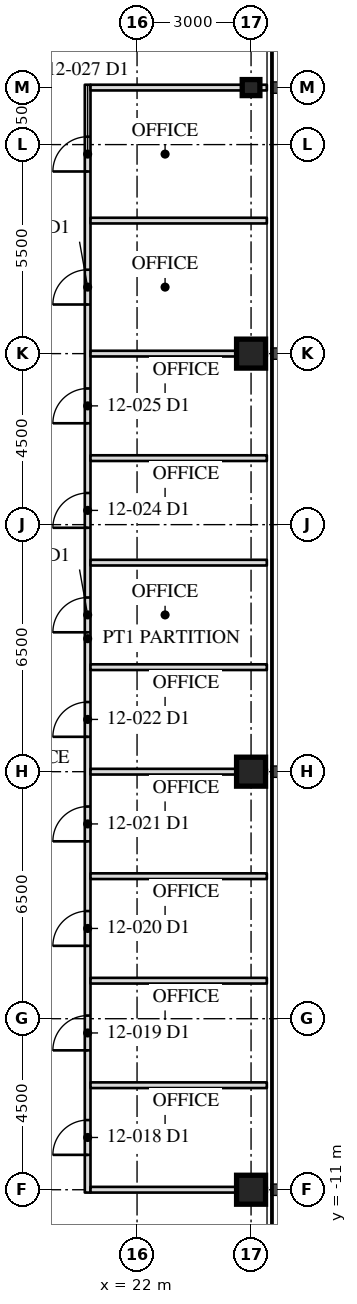
"""IFC4 building model, lengths in metres.
Left out: names, types, materials, properties, quantities, classifications, styles, units other than length and angle.
Written with IfcOpenShell. Run it as: python <this file> out.ifc"""

import sys

from ifc_helpers import new_model, si_unit, direction, frame, frame_2d, origin, origin_2d, place, context, subcontext, project, spatial, rectangle, hollow_rectangle, i_section, extrude, element, fill, save


model = new_model("IFC4")
c1 = context("Model", 3, precision=1e-05, world=origin(), true_north=direction((0.0, 1.0)))
c2 = subcontext(c1, "Body", "Model", "MODEL_VIEW")
j1 = project(units=[si_unit("LENGTHUNIT", "METRE"), si_unit("PLANEANGLEUNIT", "RADIAN")], contexts=[c1])
p1 = place(None, origin())
s1 = spatial("IfcSite", under=j1, at=p1, CompositionType="ELEMENT")
p2 = place(p1, origin())
s2 = spatial("IfcBuilding", under=s1, at=p2, CompositionType="ELEMENT")
p3 = place(p2, frame((0.0, 0.0, 52.9)))
s3 = spatial("IfcBuildingStorey", under=s2, at=p3, CompositionType="ELEMENT", Elevation=52.9)
for number, where, z_axis, x_axis in (
    (1, (25.0, -11.0, 0.0), (0.0, 0.0, 1.0), (0.0, 1.0, 0.0)),
    (2, (25.0, 0.0, 0.0), (0.0, 0.0, 1.0), (0.0, 1.0, 0.0)),
    (3, (25.0, 11.0, 0.0), (0.0, 0.0, 1.0), (0.0, 1.0, 0.0)),
):
    element("IfcColumn", number, at=place(p3, frame(where, z_axis=z_axis, x_axis=x_axis)), inside=s3, PredefinedType="COLUMN", context=c2, shape_type="SweptSolid", body=[
        extrude(hollow_rectangle(XDim=0.762, YDim=0.762, WallThickness=0.127, at=origin_2d()), origin(), (0.0, 0.0, 1.0), 4.1),
    ])
p4 = place(p3, frame((25.0, 18.0, 0.0), z_axis=(0.0, 0.0, 1.0), x_axis=(0.0, 1.0, 0.0)))
e4 = element("IfcColumn", 4, at=p4, inside=s3, PredefinedType="COLUMN", context=c2, shape_type="SweptSolid", body=[
    extrude(i_section(OverallWidth=0.422, OverallDepth=0.465, WebThickness=0.045, FlangeThickness=0.073, at=origin_2d()), origin(), (0.0, 0.0, 1.0), 4.1),
])
p5 = place(p3, frame((20.7, -11.075, 0.0), z_axis=(0.0, 0.0, 1.0), x_axis=(0.0, 1.0, 0.0)))
e5 = element("IfcWall", 5, at=p5, inside=s3, PredefinedType="PARTITIONING", context=c2, shape_type="SweptSolid", body=[
    extrude(rectangle(XDim=29.15, YDim=0.15, at=frame_2d((14.575, 0.0))), origin(), (0.0, 0.0, 1.0), 3.91),
])
p6 = place(p5, frame((0.992, 0.0, 0.0)))
e6 = element("IfcOpeningElement", 6, at=p6, cuts=e5, PredefinedType="OPENING", context=c2, shape_type="SweptSolid", body=[
    extrude(rectangle(XDim=0.915, YDim=2.134, at=frame_2d((0.458, 1.067))), frame((0.0, 0.085, 0.0), z_axis=(0.0, -1.0, 0.0), x_axis=(1.0, 0.0, 0.0)), (0.0, 0.0, 1.0), 0.17),
])
p7 = place(p5, frame((3.742, 0.0, 0.0)))
e7 = element("IfcOpeningElement", 7, at=p7, cuts=e5, PredefinedType="OPENING", context=c2, shape_type="SweptSolid", body=[
    extrude(rectangle(XDim=0.915, YDim=2.134, at=frame_2d((0.458, 1.067))), frame((0.0, 0.085, 0.0), z_axis=(0.0, -1.0, 0.0), x_axis=(1.0, 0.0, 0.0)), (0.0, 0.0, 1.0), 0.17),
])
p8 = place(p5, frame((6.492, 0.0, 0.0)))
e8 = element("IfcOpeningElement", 8, at=p8, cuts=e5, PredefinedType="OPENING", context=c2, shape_type="SweptSolid", body=[
    extrude(rectangle(XDim=0.915, YDim=2.134, at=frame_2d((0.458, 1.067))), frame((0.0, 0.085, 0.0), z_axis=(0.0, -1.0, 0.0), x_axis=(1.0, 0.0, 0.0)), (0.0, 0.0, 1.0), 0.17),
])
p9 = place(p5, frame((9.242, 0.0, 0.0)))
e9 = element("IfcOpeningElement", 9, at=p9, cuts=e5, PredefinedType="OPENING", context=c2, shape_type="SweptSolid", body=[
    extrude(rectangle(XDim=0.915, YDim=2.134, at=frame_2d((0.458, 1.067))), frame((0.0, 0.085, 0.0), z_axis=(0.0, -1.0, 0.0), x_axis=(1.0, 0.0, 0.0)), (0.0, 0.0, 1.0), 0.17),
])
p10 = place(p5, frame((11.992, 0.0, 0.0)))
e10 = element("IfcOpeningElement", 10, at=p10, cuts=e5, PredefinedType="OPENING", context=c2, shape_type="SweptSolid", body=[
    extrude(rectangle(XDim=0.915, YDim=2.134, at=frame_2d((0.458, 1.067))), frame((0.0, 0.085, 0.0), z_axis=(0.0, -1.0, 0.0), x_axis=(1.0, 0.0, 0.0)), (0.0, 0.0, 1.0), 0.17),
])
p11 = place(p5, frame((14.742, 0.0, 0.0)))
e11 = element("IfcOpeningElement", 11, at=p11, cuts=e5, PredefinedType="OPENING", context=c2, shape_type="SweptSolid", body=[
    extrude(rectangle(XDim=0.915, YDim=2.134, at=frame_2d((0.458, 1.067))), frame((0.0, 0.085, 0.0), z_axis=(0.0, -1.0, 0.0), x_axis=(1.0, 0.0, 0.0)), (0.0, 0.0, 1.0), 0.17),
])
p12 = place(p5, frame((17.492, 0.0, 0.0)))
e12 = element("IfcOpeningElement", 12, at=p12, cuts=e5, PredefinedType="OPENING", context=c2, shape_type="SweptSolid", body=[
    extrude(rectangle(XDim=0.915, YDim=2.134, at=frame_2d((0.458, 1.067))), frame((0.0, 0.085, 0.0), z_axis=(0.0, -1.0, 0.0), x_axis=(1.0, 0.0, 0.0)), (0.0, 0.0, 1.0), 0.17),
])
p13 = place(p5, frame((20.242, 0.0, 0.0)))
e13 = element("IfcOpeningElement", 13, at=p13, cuts=e5, PredefinedType="OPENING", context=c2, shape_type="SweptSolid", body=[
    extrude(rectangle(XDim=0.915, YDim=2.134, at=frame_2d((0.458, 1.067))), frame((0.0, 0.085, 0.0), z_axis=(0.0, -1.0, 0.0), x_axis=(1.0, 0.0, 0.0)), (0.0, 0.0, 1.0), 0.17),
])
p14 = place(p5, frame((23.367, 0.0, 0.0)))
e14 = element("IfcOpeningElement", 14, at=p14, cuts=e5, PredefinedType="OPENING", context=c2, shape_type="SweptSolid", body=[
    extrude(rectangle(XDim=0.915, YDim=2.134, at=frame_2d((0.458, 1.067))), frame((0.0, 0.085, 0.0), z_axis=(0.0, -1.0, 0.0), x_axis=(1.0, 0.0, 0.0)), (0.0, 0.0, 1.0), 0.17),
])
p15 = place(p5, frame((26.867, 0.0, 0.0)))
e15 = element("IfcOpeningElement", 15, at=p15, cuts=e5, PredefinedType="OPENING", context=c2, shape_type="SweptSolid", body=[
    extrude(rectangle(XDim=0.915, YDim=2.134, at=frame_2d((0.458, 1.067))), frame((0.0, 0.085, 0.0), z_axis=(0.0, -1.0, 0.0), x_axis=(1.0, 0.0, 0.0)), (0.0, 0.0, 1.0), 0.17),
])
p16 = place(p3, frame((20.775, -11.0, 0.0), z_axis=(0.0, 0.0, 1.0), x_axis=(1.0, 0.0, 0.0)))
e16 = element("IfcWall", 16, at=p16, inside=s3, PredefinedType="PARTITIONING", context=c2, shape_type="SweptSolid", body=[
    extrude(rectangle(XDim=4.64, YDim=0.15, at=frame_2d((2.32, 0.0))), origin(), (0.0, 0.0, 1.0), 3.13),
])
for number, where, z_axis, x_axis in (
    (17, (20.775, -8.25, 0.0), (0.0, 0.0, 1.0), (1.0, 0.0, 0.0)),
    (18, (20.775, -5.5, 0.0), (0.0, 0.0, 1.0), (1.0, 0.0, 0.0)),
    (19, (20.775, -2.75, 0.0), (0.0, 0.0, 1.0), (1.0, 0.0, 0.0)),
):
    element("IfcWall", number, at=place(p3, frame(where, z_axis=z_axis, x_axis=x_axis)), inside=s3, PredefinedType="PARTITIONING", context=c2, shape_type="SweptSolid", body=[
        extrude(rectangle(XDim=4.64, YDim=0.15, at=frame_2d((2.32, 0.0))), origin(), (0.0, 0.0, 1.0), 3.91),
    ])
p17 = place(p3, frame((20.775, 0.0, 0.0), z_axis=(0.0, 0.0, 1.0), x_axis=(1.0, 0.0, 0.0)))
e20 = element("IfcWall", 20, at=p17, inside=s3, PredefinedType="PARTITIONING", context=c2, shape_type="SweptSolid", body=[
    extrude(rectangle(XDim=4.64, YDim=0.15, at=frame_2d((2.32, 0.0))), origin(), (0.0, 0.0, 1.0), 3.13),
])
for number, where, z_axis, x_axis in (
    (21, (20.775, 2.75, 0.0), (0.0, 0.0, 1.0), (1.0, 0.0, 0.0)),
    (22, (20.775, 5.5, 0.0), (0.0, 0.0, 1.0), (1.0, 0.0, 0.0)),
    (23, (20.775, 8.25, 0.0), (0.0, 0.0, 1.0), (1.0, 0.0, 0.0)),
):
    element("IfcWall", number, at=place(p3, frame(where, z_axis=z_axis, x_axis=x_axis)), inside=s3, PredefinedType="PARTITIONING", context=c2, shape_type="SweptSolid", body=[
        extrude(rectangle(XDim=4.64, YDim=0.15, at=frame_2d((2.32, 0.0))), origin(), (0.0, 0.0, 1.0), 3.91),
    ])
p18 = place(p3, frame((20.775, 11.0, 0.0), z_axis=(0.0, 0.0, 1.0), x_axis=(1.0, 0.0, 0.0)))
e24 = element("IfcWall", 24, at=p18, inside=s3, PredefinedType="PARTITIONING", context=c2, shape_type="SweptSolid", body=[
    extrude(rectangle(XDim=4.64, YDim=0.15, at=frame_2d((2.32, 0.0))), origin(), (0.0, 0.0, 1.0), 3.13),
])
for number, where, z_axis, x_axis in (
    (25, (20.775, 14.5, 0.0), (0.0, 0.0, 1.0), (1.0, 0.0, 0.0)),
    (26, (20.775, 18.0, 0.0), (0.0, 0.0, 1.0), (1.0, 0.0, 0.0)),
):
    element("IfcWall", number, at=place(p3, frame(where, z_axis=z_axis, x_axis=x_axis)), inside=s3, PredefinedType="PARTITIONING", context=c2, shape_type="SweptSolid", body=[
        extrude(rectangle(XDim=4.64, YDim=0.15, at=frame_2d((2.32, 0.0))), origin(), (0.0, 0.0, 1.0), 3.91),
    ])
p19 = place(p6, origin())
e27 = element("IfcDoor", 27, at=p19, inside=s3, OperationType="SINGLE_SWING_LEFT", PredefinedType="DOOR", context=c2, shape_type="SweptSolid", body=[
    extrude(rectangle(XDim=0.915, YDim=2.134, at=frame_2d((0.458, 1.067))), frame((0.0, 0.025, 0.0), z_axis=(0.0, -1.0, 0.0), x_axis=(1.0, 0.0, 0.0)), (0.0, 0.0, 1.0), 0.05),
])
fill(e6, e27)
p20 = place(p7, origin())
e28 = element("IfcDoor", 28, at=p20, inside=s3, OperationType="SINGLE_SWING_LEFT", PredefinedType="DOOR", context=c2, shape_type="SweptSolid", body=[
    extrude(rectangle(XDim=0.915, YDim=2.134, at=frame_2d((0.458, 1.067))), frame((0.0, 0.025, 0.0), z_axis=(0.0, -1.0, 0.0), x_axis=(1.0, 0.0, 0.0)), (0.0, 0.0, 1.0), 0.05),
])
fill(e7, e28)
p21 = place(p8, origin())
e29 = element("IfcDoor", 29, at=p21, inside=s3, OperationType="SINGLE_SWING_LEFT", PredefinedType="DOOR", context=c2, shape_type="SweptSolid", body=[
    extrude(rectangle(XDim=0.915, YDim=2.134, at=frame_2d((0.458, 1.067))), frame((0.0, 0.025, 0.0), z_axis=(0.0, -1.0, 0.0), x_axis=(1.0, 0.0, 0.0)), (0.0, 0.0, 1.0), 0.05),
])
fill(e8, e29)
p22 = place(p9, origin())
e30 = element("IfcDoor", 30, at=p22, inside=s3, OperationType="SINGLE_SWING_LEFT", PredefinedType="DOOR", context=c2, shape_type="SweptSolid", body=[
    extrude(rectangle(XDim=0.915, YDim=2.134, at=frame_2d((0.458, 1.067))), frame((0.0, 0.025, 0.0), z_axis=(0.0, -1.0, 0.0), x_axis=(1.0, 0.0, 0.0)), (0.0, 0.0, 1.0), 0.05),
])
fill(e9, e30)
p23 = place(p10, origin())
e31 = element("IfcDoor", 31, at=p23, inside=s3, OperationType="SINGLE_SWING_LEFT", PredefinedType="DOOR", context=c2, shape_type="SweptSolid", body=[
    extrude(rectangle(XDim=0.915, YDim=2.134, at=frame_2d((0.458, 1.067))), frame((0.0, 0.025, 0.0), z_axis=(0.0, -1.0, 0.0), x_axis=(1.0, 0.0, 0.0)), (0.0, 0.0, 1.0), 0.05),
])
fill(e10, e31)
p24 = place(p11, origin())
e32 = element("IfcDoor", 32, at=p24, inside=s3, OperationType="SINGLE_SWING_LEFT", PredefinedType="DOOR", context=c2, shape_type="SweptSolid", body=[
    extrude(rectangle(XDim=0.915, YDim=2.134, at=frame_2d((0.458, 1.067))), frame((0.0, 0.025, 0.0), z_axis=(0.0, -1.0, 0.0), x_axis=(1.0, 0.0, 0.0)), (0.0, 0.0, 1.0), 0.05),
])
fill(e11, e32)
p25 = place(p12, origin())
e33 = element("IfcDoor", 33, at=p25, inside=s3, OperationType="SINGLE_SWING_LEFT", PredefinedType="DOOR", context=c2, shape_type="SweptSolid", body=[
    extrude(rectangle(XDim=0.915, YDim=2.134, at=frame_2d((0.458, 1.067))), frame((0.0, 0.025, 0.0), z_axis=(0.0, -1.0, 0.0), x_axis=(1.0, 0.0, 0.0)), (0.0, 0.0, 1.0), 0.05),
])
fill(e12, e33)
p26 = place(p13, origin())
e34 = element("IfcDoor", 34, at=p26, inside=s3, OperationType="SINGLE_SWING_LEFT", PredefinedType="DOOR", context=c2, shape_type="SweptSolid", body=[
    extrude(rectangle(XDim=0.915, YDim=2.134, at=frame_2d((0.458, 1.067))), frame((0.0, 0.025, 0.0), z_axis=(0.0, -1.0, 0.0), x_axis=(1.0, 0.0, 0.0)), (0.0, 0.0, 1.0), 0.05),
])
fill(e13, e34)
p27 = place(p14, origin())
e35 = element("IfcDoor", 35, at=p27, inside=s3, OperationType="SINGLE_SWING_LEFT", PredefinedType="DOOR", context=c2, shape_type="SweptSolid", body=[
    extrude(rectangle(XDim=0.915, YDim=2.134, at=frame_2d((0.458, 1.067))), frame((0.0, 0.025, 0.0), z_axis=(0.0, -1.0, 0.0), x_axis=(1.0, 0.0, 0.0)), (0.0, 0.0, 1.0), 0.05),
])
fill(e14, e35)
p28 = place(p15, origin())
e36 = element("IfcDoor", 36, at=p28, inside=s3, OperationType="SINGLE_SWING_LEFT", PredefinedType="DOOR", context=c2, shape_type="SweptSolid", body=[
    extrude(rectangle(XDim=0.915, YDim=2.134, at=frame_2d((0.458, 1.067))), frame((0.0, 0.025, 0.0), z_axis=(0.0, -1.0, 0.0), x_axis=(1.0, 0.0, 0.0)), (0.0, 0.0, 1.0), 0.05),
])
fill(e15, e36)
save(model, sys.argv[1])
